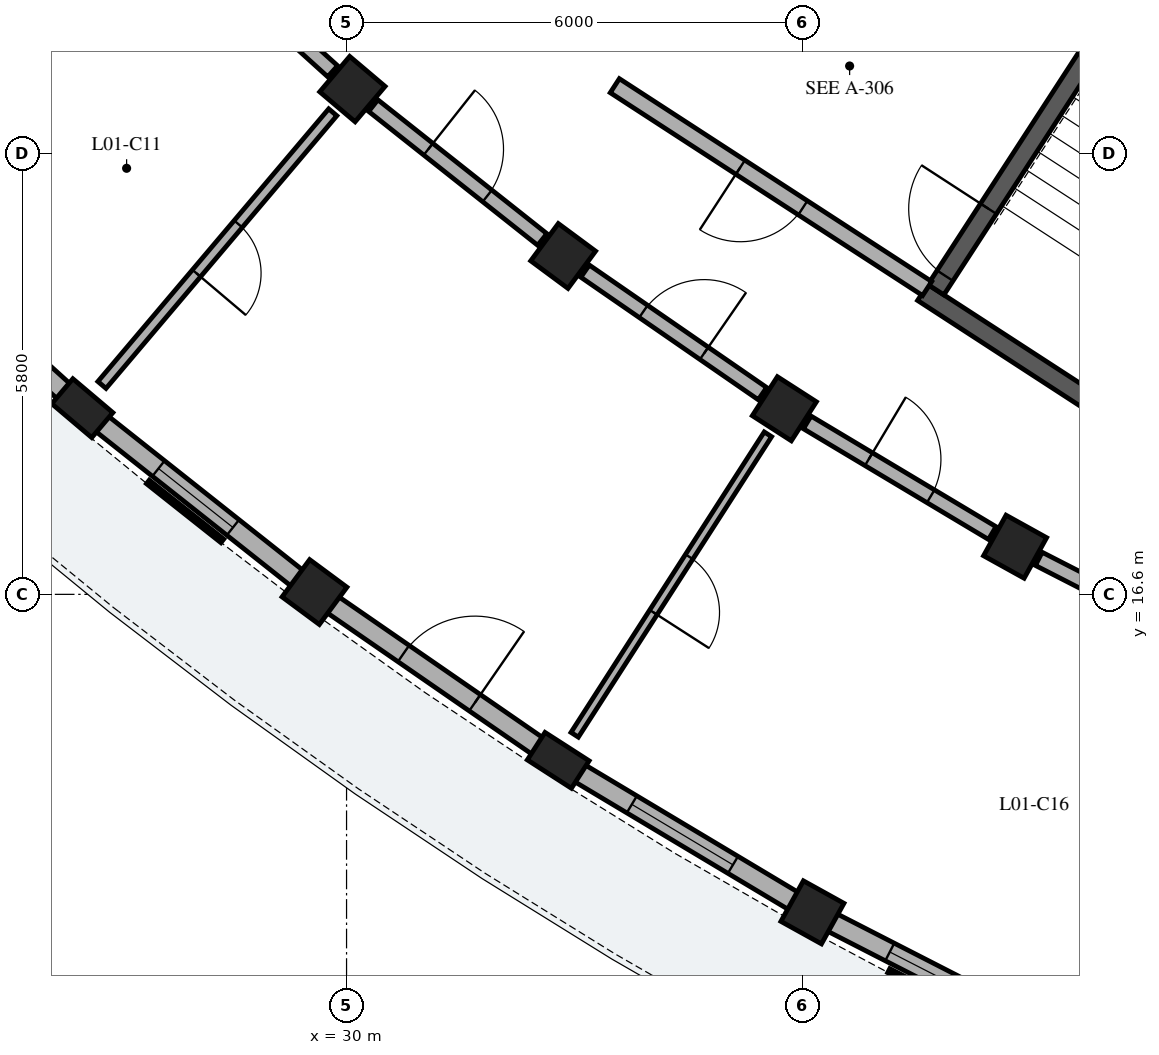
"""IFC4 building model, lengths in metres.
Left out: names, types, materials, properties, quantities, classifications, styles, units other than length and angle.
Written with IfcOpenShell. Run it as: python <this file> out.ifc"""

import sys

from ifc_helpers import new_model, si_unit, direction, frame, frame_2d, origin, origin_2d, place, context, subcontext, project, spatial, rectangle, extrude, element, fill, save


model = new_model("IFC4")
c1 = context("Model", 3, precision=1e-05, world=origin(), true_north=direction((0.0, 1.0)))
c2 = subcontext(c1, "Body", "Model", "MODEL_VIEW")
j1 = project(units=[si_unit("LENGTHUNIT", "METRE"), si_unit("PLANEANGLEUNIT", "RADIAN")], contexts=[c1])
p1 = place(None, origin())
s1 = spatial("IfcSite", under=j1, at=p1, CompositionType="ELEMENT")
p2 = place(p1, origin())
s2 = spatial("IfcBuilding", under=s1, at=p2, CompositionType="ELEMENT")
p3 = place(p2, frame((0.0, 0.0, 4.76)))
s3 = spatial("IfcBuildingStorey", under=s2, at=p3, CompositionType="ELEMENT", Elevation=4.76)
p4 = place(p3, frame((40.449, 18.709, 0.0), z_axis=(0.0, 0.0, 1.0), x_axis=(-0.838678407117, 0.544626963559, 0.0)))
e1 = element("IfcWall", 1, at=p4, inside=s3, PredefinedType="SHEAR", context=c2, shape_type="SweptSolid", body=[
    extrude(rectangle(XDim=3.42, YDim=0.25, at=frame_2d((1.71, 0.0))), origin(), (0.0, 0.0, 1.0), 3.83),
])
p5 = place(p3, frame((37.754, 20.608, 0.0), z_axis=(0.0, 0.0, 1.0), x_axis=(0.544655453679, 0.838659905312, 0.0)))
e2 = element("IfcWall", 2, at=p5, inside=s3, PredefinedType="SHEAR", context=c2, shape_type="SweptSolid", body=[
    extrude(rectangle(XDim=6.6, YDim=0.25, at=frame_2d((3.3, 0.0))), origin(), (0.0, 0.0, 1.0), 3.83),
])
p6 = place(p5, frame((0.22, 0.0, 0.0)))
e3 = element("IfcOpeningElement", 3, at=p6, cuts=e2, PredefinedType="OPENING", context=c2, shape_type="SweptSolid", body=[
    extrude(rectangle(XDim=1.05, YDim=2.15, at=frame_2d((0.525, 1.075))), frame((0.0, 0.135, 0.0), z_axis=(0.0, -1.0, 0.0), x_axis=(1.0, 0.0, 0.0)), (0.0, 0.0, 1.0), 0.27),
])
p7 = place(p3, frame((30.077, 23.247, 0.0), z_axis=(0.0, 0.0, 1.0), x_axis=(-0.646123979643, -0.763232469783, 0.0)))
e4 = element("IfcColumn", 4, at=p7, inside=s3, PredefinedType="COLUMN", context=c2, shape_type="SweptSolid", body=[
    extrude(rectangle(XDim=0.61, YDim=0.61, at=origin_2d()), origin(), (0.0, 0.0, 1.0), 3.825),
])
p8 = place(p3, frame((26.523, 19.05, 0.0), z_axis=(0.0, 0.0, 1.0), x_axis=(-0.646123979643, -0.763232469783, 0.0)))
e5 = element("IfcColumn", 5, at=p8, inside=s3, PredefinedType="PILASTER", context=c2, shape_type="SweptSolid", body=[
    extrude(rectangle(XDim=0.43, YDim=0.69, at=origin_2d()), origin(), (0.0, 0.0, 1.0), 3.825),
])
for number, where, z_axis, x_axis in (
    (6, (32.85, 21.052, 0.0), (0.0, 0.0, 1.0), (-0.595, -0.804, 0.0)),
    (7, (29.578, 16.63, 0.0), (0.0, 0.0, 1.0), (-0.595, -0.804, 0.0)),
    (8, (35.76, 19.042, 0.0), (0.0, 0.0, 1.0), (-0.541, -0.841, 0.0)),
):
    element("IfcColumn", number, at=place(p3, frame(where, z_axis=z_axis, x_axis=x_axis)), inside=s3, PredefinedType="COLUMN", context=c2, shape_type="SweptSolid", body=[
        extrude(rectangle(XDim=0.61, YDim=0.61, at=origin_2d()), origin(), (0.0, 0.0, 1.0), 3.825),
    ])
p9 = place(p3, frame((32.785, 14.416, 0.0), z_axis=(0.0, 0.0, 1.0), x_axis=(-0.540974471368, -0.841039012964, 0.0)))
e9 = element("IfcColumn", 9, at=p9, inside=s3, PredefinedType="PILASTER", context=c2, shape_type="SweptSolid", body=[
    extrude(rectangle(XDim=0.43, YDim=0.69, at=origin_2d()), origin(), (0.0, 0.0, 1.0), 3.825),
])
for number, where, z_axis, x_axis in (
    (10, (38.796, 17.227, 0.0), (0.0, 0.0, 1.0), (-0.485, -0.875, 0.0)),
    (11, (36.13, 12.417, 0.0), (0.0, 0.0, 1.0), (-0.485, -0.875, 0.0)),
):
    element("IfcColumn", number, at=place(p3, frame(where, z_axis=z_axis, x_axis=x_axis)), inside=s3, PredefinedType="COLUMN", context=c2, shape_type="SweptSolid", body=[
        extrude(rectangle(XDim=0.61, YDim=0.61, at=origin_2d()), origin(), (0.0, 0.0, 1.0), 3.825),
    ])
p10 = place(p3, frame((23.837, 21.479, 0.0), z_axis=(0.0, 0.0, 1.0), x_axis=(0.741699000924, -0.670732876806, 0.0)))
e12 = element("IfcWall", 12, at=p10, inside=s3, PredefinedType="SOLIDWALL", context=c2, shape_type="SweptSolid", body=[
    extrude(rectangle(XDim=3.437, YDim=0.26, at=frame_2d((1.718, 0.0))), origin(), (0.0, 0.0, 1.0), 3.075),
])
p11 = place(p10, frame((0.838, 0.0, 0.55)))
e13 = element("IfcOpeningElement", 13, at=p11, cuts=e12, PredefinedType="OPENING", context=c2, shape_type="SweptSolid", body=[
    extrude(rectangle(XDim=1.76, YDim=1.635, at=frame_2d((0.88, 0.817))), frame((0.0, 0.14, 0.0), z_axis=(0.0, -1.0, 0.0), x_axis=(1.0, 0.0, 0.0)), (0.0, 0.0, 1.0), 0.28),
])
p12 = place(p3, frame((26.668, 18.935, 0.0), z_axis=(0.0, 0.0, 1.0), x_axis=(0.783970914649, -0.620797555556, 0.0)))
e14 = element("IfcWall", 14, at=p12, inside=s3, PredefinedType="SOLIDWALL", context=c2, shape_type="SweptSolid", body=[
    extrude(rectangle(XDim=3.437, YDim=0.26, at=frame_2d((1.718, 0.0))), origin(), (0.0, 0.0, 1.0), 3.075),
])
p13 = place(p12, frame((1.094, 0.0, 0.55)))
e15 = element("IfcOpeningElement", 15, at=p13, cuts=e14, PredefinedType="OPENING", context=c2, shape_type="SweptSolid", body=[
    extrude(rectangle(XDim=1.25, YDim=1.6, at=frame_2d((0.625, 0.8))), frame((0.0, 0.14, 0.0), z_axis=(0.0, -1.0, 0.0), x_axis=(1.0, 0.0, 0.0)), (0.0, 0.0, 1.0), 0.28),
])
p14 = place(p3, frame((29.805, 16.474, 0.0), z_axis=(0.0, 0.0, 1.0), x_axis=(0.822879502564, -0.568215913416, 0.0)))
e16 = element("IfcWall", 16, at=p14, inside=s3, PredefinedType="SOLIDWALL", context=c2, shape_type="SweptSolid", body=[
    extrude(rectangle(XDim=3.437, YDim=0.26, at=frame_2d((1.718, 0.0))), origin(), (0.0, 0.0, 1.0), 3.075),
])
p15 = place(p14, frame((1.148, 0.0, 0.0)))
e17 = element("IfcOpeningElement", 17, at=p15, cuts=e16, PredefinedType="OPENING", context=c2, shape_type="SweptSolid", body=[
    extrude(rectangle(XDim=1.14, YDim=2.16, at=frame_2d((0.57, 1.08))), frame((0.0, 0.14, 0.0), z_axis=(0.0, -1.0, 0.0), x_axis=(1.0, 0.0, 0.0)), (0.0, 0.0, 1.0), 0.28),
])
p16 = place(p3, frame((32.944, 14.321, 0.0), z_axis=(0.0, 0.0, 1.0), x_axis=(0.858281691366, -0.51317885602, 0.0)))
e18 = element("IfcWall", 18, at=p16, inside=s3, PredefinedType="SOLIDWALL", context=c2, shape_type="SweptSolid", body=[
    extrude(rectangle(XDim=3.437, YDim=0.26, at=frame_2d((1.718, 0.0))), origin(), (0.0, 0.0, 1.0), 3.075),
])
p17 = place(p16, frame((0.943, 0.0, 0.55)))
e19 = element("IfcOpeningElement", 19, at=p17, cuts=e18, PredefinedType="OPENING", context=c2, shape_type="SweptSolid", body=[
    extrude(rectangle(XDim=1.55, YDim=1.75, at=frame_2d((0.775, 0.875))), frame((0.0, 0.14, 0.0), z_axis=(0.0, -1.0, 0.0), x_axis=(1.0, 0.0, 0.0)), (0.0, 0.0, 1.0), 0.28),
])
p18 = place(p3, frame((36.374, 12.291, 0.0), z_axis=(0.0, 0.0, 1.0), x_axis=(0.890022976809, -0.455915672852, 0.0)))
e20 = element("IfcWall", 20, at=p18, inside=s3, PredefinedType="SOLIDWALL", context=c2, shape_type="SweptSolid", body=[
    extrude(rectangle(XDim=3.437, YDim=0.26, at=frame_2d((1.718, 0.0))), origin(), (0.0, 0.0, 1.0), 3.075),
])
p19 = place(p18, frame((0.868, 0.0, 0.55)))
e21 = element("IfcOpeningElement", 21, at=p19, cuts=e20, PredefinedType="OPENING", context=c2, shape_type="SweptSolid", body=[
    extrude(rectangle(XDim=1.7, YDim=1.8, at=frame_2d((0.85, 0.9))), frame((0.0, 0.14, 0.0), z_axis=(0.0, -1.0, 0.0), x_axis=(1.0, 0.0, 0.0)), (0.0, 0.0, 1.0), 0.28),
])
p20 = place(p3, frame((37.639, 20.623, 0.0), z_axis=(0.0, 0.0, 1.0), x_axis=(-0.838681446513, 0.544622283124, 0.0)))
e22 = element("IfcWall", 22, at=p20, inside=s3, PredefinedType="PARTITIONING", context=c2, shape_type="SweptSolid", body=[
    extrude(rectangle(XDim=4.9, YDim=0.22, at=frame_2d((2.45, 0.0))), origin(), (0.0, 0.0, 1.0), 3.06),
])
p21 = place(p20, frame((1.95, 0.0, 0.0)))
e23 = element("IfcOpeningElement", 23, at=p21, cuts=e22, PredefinedType="OPENING", context=c2, shape_type="SweptSolid", body=[
    extrude(rectangle(XDim=0.98, YDim=2.14, at=frame_2d((0.49, 1.07))), frame((0.0, 0.12, 0.0), z_axis=(0.0, -1.0, 0.0), x_axis=(1.0, 0.0, 0.0)), (0.0, 0.0, 1.0), 0.24),
])
p22 = place(p3, frame((27.713, 25.385, 0.0), z_axis=(0.0, 0.0, 1.0), x_axis=(0.741631592147, -0.670807410163, 0.0)))
e24 = element("IfcWall", 24, at=p22, inside=s3, PredefinedType="PARTITIONING", context=c2, shape_type="SweptSolid", body=[
    extrude(rectangle(XDim=2.837, YDim=0.195, at=frame_2d((1.418, 0.0))), origin(), (0.0, 0.0, 1.0), 3.09),
])
p23 = place(p22, frame((0.954, 0.0, 0.0)))
e25 = element("IfcOpeningElement", 25, at=p23, cuts=e24, PredefinedType="OPENING", context=c2, shape_type="SweptSolid", body=[
    extrude(rectangle(XDim=0.93, YDim=2.12, at=frame_2d((0.465, 1.06))), frame((0.0, 0.107, 0.0), z_axis=(0.0, -1.0, 0.0), x_axis=(1.0, 0.0, 0.0)), (0.0, 0.0, 1.0), 0.215),
])
p24 = place(p3, frame((29.819, 22.942, 0.0), z_axis=(0.0, 0.0, 1.0), x_axis=(-0.646137818229, -0.76322075434, 0.0)))
e26 = element("IfcWall", 26, at=p24, inside=s3, PredefinedType="PLUMBINGWALL", context=c2, shape_type="SweptSolid", body=[
    extrude(rectangle(XDim=4.7, YDim=0.14, at=frame_2d((2.35, 0.0))), origin(), (0.0, 0.0, 1.0), 3.09),
])
p25 = place(p24, frame((1.925, 0.0, 0.0)))
e27 = element("IfcOpeningElement", 27, at=p25, cuts=e26, PredefinedType="OPENING", context=c2, shape_type="SweptSolid", body=[
    extrude(rectangle(XDim=0.85, YDim=2.05, at=frame_2d((0.425, 1.025))), frame((0.0, 0.08, 0.0), z_axis=(0.0, -1.0, 0.0), x_axis=(1.0, 0.0, 0.0)), (0.0, 0.0, 1.0), 0.16),
])
p26 = place(p3, frame((30.351, 23.03, 0.0), z_axis=(0.0, 0.0, 1.0), x_axis=(0.783965548427, -0.620804332201, 0.0)))
e28 = element("IfcWall", 28, at=p26, inside=s3, PredefinedType="PARTITIONING", context=c2, shape_type="SweptSolid", body=[
    extrude(rectangle(XDim=2.837, YDim=0.195, at=frame_2d((1.418, 0.0))), origin(), (0.0, 0.0, 1.0), 3.09),
])
p27 = place(p26, frame((0.924, 0.0, 0.0)))
e29 = element("IfcOpeningElement", 29, at=p27, cuts=e28, PredefinedType="OPENING", context=c2, shape_type="SweptSolid", body=[
    extrude(rectangle(XDim=0.99, YDim=2.16, at=frame_2d((0.495, 1.08))), frame((0.0, 0.107, 0.0), z_axis=(0.0, -1.0, 0.0), x_axis=(1.0, 0.0, 0.0)), (0.0, 0.0, 1.0), 0.215),
])
p28 = place(p3, frame((33.138, 20.853, 0.0), z_axis=(0.0, 0.0, 1.0), x_axis=(0.822870075235, -0.568229565653, 0.0)))
e30 = element("IfcWall", 30, at=p28, inside=s3, PredefinedType="PARTITIONING", context=c2, shape_type="SweptSolid", body=[
    extrude(rectangle(XDim=2.837, YDim=0.195, at=frame_2d((1.418, 0.0))), origin(), (0.0, 0.0, 1.0), 3.09),
])
p29 = place(p28, frame((0.934, 0.0, 0.0)))
e31 = element("IfcOpeningElement", 31, at=p29, cuts=e30, PredefinedType="OPENING", context=c2, shape_type="SweptSolid", body=[
    extrude(rectangle(XDim=0.97, YDim=2.15, at=frame_2d((0.485, 1.075))), frame((0.0, 0.107, 0.0), z_axis=(0.0, -1.0, 0.0), x_axis=(1.0, 0.0, 0.0)), (0.0, 0.0, 1.0), 0.215),
])
p30 = place(p3, frame((35.544, 18.705, 0.0), z_axis=(0.0, 0.0, 1.0), x_axis=(-0.540959731567, -0.84104849374, 0.0)))
e32 = element("IfcWall", 32, at=p30, inside=s3, PredefinedType="PARTITIONING", context=c2, shape_type="SweptSolid", body=[
    extrude(rectangle(XDim=4.7, YDim=0.115, at=frame_2d((2.35, 0.0))), origin(), (0.0, 0.0, 1.0), 3.09),
])
p31 = place(p30, frame((1.915, 0.0, 0.0)))
e33 = element("IfcOpeningElement", 33, at=p31, cuts=e32, PredefinedType="OPENING", context=c2, shape_type="SweptSolid", body=[
    extrude(rectangle(XDim=0.87, YDim=2.08, at=frame_2d((0.435, 1.04))), frame((0.0, 0.067, 0.0), z_axis=(0.0, -1.0, 0.0), x_axis=(1.0, 0.0, 0.0)), (0.0, 0.0, 1.0), 0.135),
])
p32 = place(p3, frame((36.061, 18.862, 0.0), z_axis=(0.0, 0.0, 1.0), x_axis=(0.858281647443, -0.51317892948, 0.0)))
e34 = element("IfcWall", 34, at=p32, inside=s3, PredefinedType="PARTITIONING", context=c2, shape_type="SweptSolid", body=[
    extrude(rectangle(XDim=2.837, YDim=0.195, at=frame_2d((1.418, 0.0))), origin(), (0.0, 0.0, 1.0), 3.09),
])
p33 = place(p32, frame((0.944, 0.0, 0.0)))
e35 = element("IfcOpeningElement", 35, at=p33, cuts=e34, PredefinedType="OPENING", context=c2, shape_type="SweptSolid", body=[
    extrude(rectangle(XDim=0.95, YDim=2.13, at=frame_2d((0.475, 1.065))), frame((0.0, 0.107, 0.0), z_axis=(0.0, -1.0, 0.0), x_axis=(1.0, 0.0, 0.0)), (0.0, 0.0, 1.0), 0.215),
])
p34 = place(p3, frame((39.107, 17.067, 0.0), z_axis=(0.0, 0.0, 1.0), x_axis=(0.890030590607, -0.45590080915, 0.0)))
e36 = element("IfcWall", 36, at=p34, inside=s3, PredefinedType="PARTITIONING", context=c2, shape_type="SweptSolid", body=[
    extrude(rectangle(XDim=2.837, YDim=0.195, at=frame_2d((1.418, 0.0))), origin(), (0.0, 0.0, 1.0), 3.09),
])
p35 = place(p34, frame((0.954, 0.0, 0.0)))
e37 = element("IfcOpeningElement", 37, at=p35, cuts=e36, PredefinedType="OPENING", context=c2, shape_type="SweptSolid", body=[
    extrude(rectangle(XDim=0.93, YDim=2.12, at=frame_2d((0.465, 1.06))), frame((0.0, 0.107, 0.0), z_axis=(0.0, -1.0, 0.0), x_axis=(1.0, 0.0, 0.0)), (0.0, 0.0, 1.0), 0.215),
])
p36 = place(p13, origin())
e38 = element("IfcWindow", 38, at=p36, inside=s3, PartitioningType="SINGLE_PANEL", PredefinedType="WINDOW", context=c2, shape_type="SweptSolid", body=[
    extrude(rectangle(XDim=1.25, YDim=1.6, at=frame_2d((0.625, 0.8))), frame((0.0, 0.03, 0.0), z_axis=(0.0, -1.0, 0.0), x_axis=(1.0, 0.0, 0.0)), (0.0, 0.0, 1.0), 0.06),
])
fill(e15, e38)
p37 = place(p15, origin())
e39 = element("IfcDoor", 39, at=p37, inside=s3, OperationType="SINGLE_SWING_RIGHT", PredefinedType="DOOR", context=c2, shape_type="SweptSolid", body=[
    extrude(rectangle(XDim=1.14, YDim=2.16, at=frame_2d((0.57, 1.08))), frame((0.0, 0.025, 0.0), z_axis=(0.0, -1.0, 0.0), x_axis=(1.0, 0.0, 0.0)), (0.0, 0.0, 1.0), 0.05),
])
fill(e17, e39)
p38 = place(p17, origin())
e40 = element("IfcWindow", 40, at=p38, inside=s3, PartitioningType="SINGLE_PANEL", PredefinedType="WINDOW", context=c2, shape_type="SweptSolid", body=[
    extrude(rectangle(XDim=1.55, YDim=1.75, at=frame_2d((0.775, 0.875))), frame((0.0, 0.03, 0.0), z_axis=(0.0, -1.0, 0.0), x_axis=(1.0, 0.0, 0.0)), (0.0, 0.0, 1.0), 0.06),
])
fill(e19, e40)
p39 = place(p19, origin())
e41 = element("IfcWindow", 41, at=p39, inside=s3, PartitioningType="SINGLE_PANEL", PredefinedType="WINDOW", context=c2, shape_type="SweptSolid", body=[
    extrude(rectangle(XDim=1.7, YDim=1.8, at=frame_2d((0.85, 0.9))), frame((0.0, 0.03, 0.0), z_axis=(0.0, -1.0, 0.0), x_axis=(1.0, 0.0, 0.0)), (0.0, 0.0, 1.0), 0.06),
])
fill(e21, e41)
p40 = place(p6, origin())
e42 = element("IfcDoor", 42, at=p40, inside=s3, OperationType="SINGLE_SWING_RIGHT", PredefinedType="DOOR", context=c2, shape_type="SweptSolid", body=[
    extrude(rectangle(XDim=1.05, YDim=2.15, at=frame_2d((0.525, 1.075))), frame((0.0, 0.025, 0.0), z_axis=(0.0, -1.0, 0.0), x_axis=(1.0, 0.0, 0.0)), (0.0, 0.0, 1.0), 0.05),
])
fill(e3, e42)
p41 = place(p21, origin())
e43 = element("IfcDoor", 43, at=p41, inside=s3, OperationType="SINGLE_SWING_RIGHT", PredefinedType="DOOR", context=c2, shape_type="SweptSolid", body=[
    extrude(rectangle(XDim=0.98, YDim=2.14, at=frame_2d((0.49, 1.07))), frame((0.0, 0.025, 0.0), z_axis=(0.0, -1.0, 0.0), x_axis=(1.0, 0.0, 0.0)), (0.0, 0.0, 1.0), 0.05),
])
fill(e23, e43)
p42 = place(p25, origin())
e44 = element("IfcDoor", 44, at=p42, inside=s3, OperationType="SINGLE_SWING_RIGHT", PredefinedType="DOOR", context=c2, shape_type="SweptSolid", body=[
    extrude(rectangle(XDim=0.85, YDim=2.05, at=frame_2d((0.425, 1.025))), frame((0.0, 0.025, 0.0), z_axis=(0.0, -1.0, 0.0), x_axis=(1.0, 0.0, 0.0)), (0.0, 0.0, 1.0), 0.05),
])
fill(e27, e44)
p43 = place(p27, origin())
e45 = element("IfcDoor", 45, at=p43, inside=s3, OperationType="SINGLE_SWING_LEFT", PredefinedType="DOOR", context=c2, shape_type="SweptSolid", body=[
    extrude(rectangle(XDim=0.99, YDim=2.16, at=frame_2d((0.495, 1.08))), frame((0.0, 0.025, 0.0), z_axis=(0.0, -1.0, 0.0), x_axis=(1.0, 0.0, 0.0)), (0.0, 0.0, 1.0), 0.05),
])
fill(e29, e45)
p44 = place(p29, origin())
e46 = element("IfcDoor", 46, at=p44, inside=s3, OperationType="SINGLE_SWING_RIGHT", PredefinedType="DOOR", context=c2, shape_type="SweptSolid", body=[
    extrude(rectangle(XDim=0.97, YDim=2.15, at=frame_2d((0.485, 1.075))), frame((0.0, 0.025, 0.0), z_axis=(0.0, -1.0, 0.0), x_axis=(1.0, 0.0, 0.0)), (0.0, 0.0, 1.0), 0.05),
])
fill(e31, e46)
p45 = place(p31, origin())
e47 = element("IfcDoor", 47, at=p45, inside=s3, OperationType="SINGLE_SWING_RIGHT", PredefinedType="DOOR", context=c2, shape_type="SweptSolid", body=[
    extrude(rectangle(XDim=0.87, YDim=2.08, at=frame_2d((0.435, 1.04))), frame((0.0, 0.025, 0.0), z_axis=(0.0, -1.0, 0.0), x_axis=(1.0, 0.0, 0.0)), (0.0, 0.0, 1.0), 0.05),
])
fill(e33, e47)
p46 = place(p33, origin())
e48 = element("IfcDoor", 48, at=p46, inside=s3, OperationType="SINGLE_SWING_LEFT", PredefinedType="DOOR", context=c2, shape_type="SweptSolid", body=[
    extrude(rectangle(XDim=0.95, YDim=2.13, at=frame_2d((0.475, 1.065))), frame((0.0, 0.025, 0.0), z_axis=(0.0, -1.0, 0.0), x_axis=(1.0, 0.0, 0.0)), (0.0, 0.0, 1.0), 0.05),
])
fill(e35, e48)
save(model, sys.argv[1])
